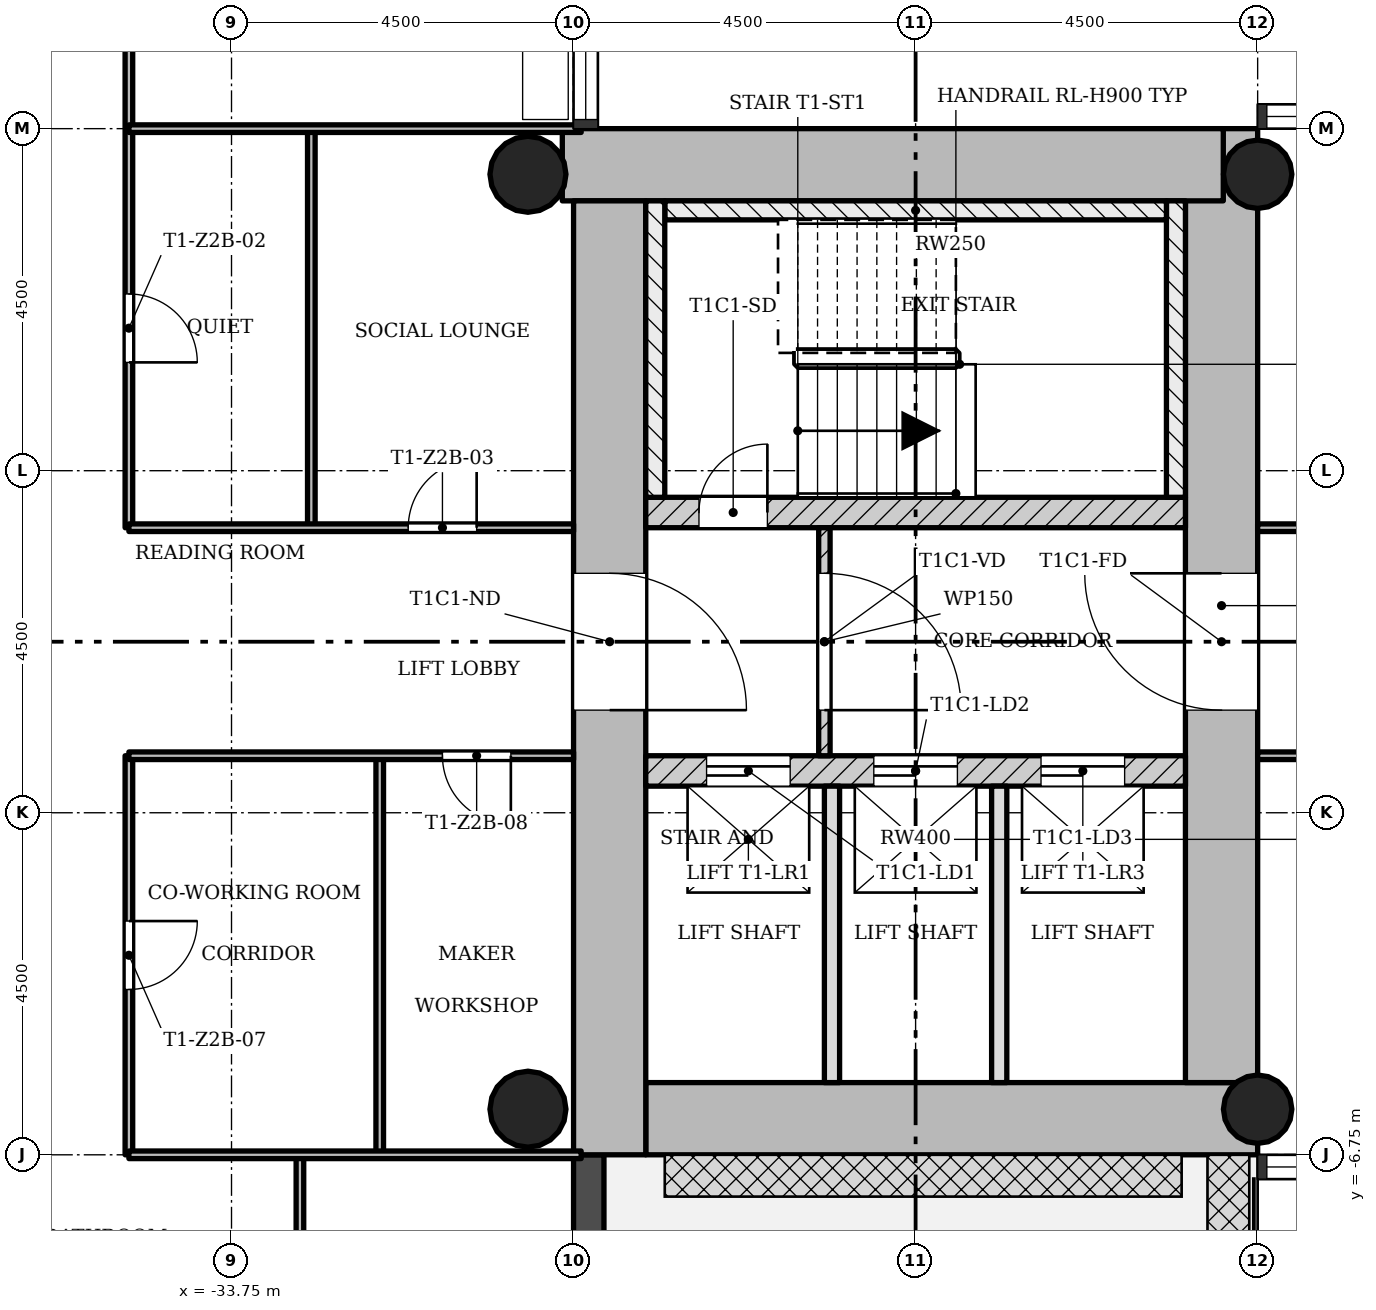
"""IFC4 building model, lengths in metres.
Left out: names, types, materials, properties, quantities, classifications, styles, units other than length and angle.
Written with IfcOpenShell. Run it as: python <this file> out.ifc"""

import sys

from ifc_helpers import new_model, si_unit, direction, frame, frame_2d, origin, origin_2d, place, context, subcontext, project, spatial, rectangle, hollow_circle, extrude, element, fill, save


model = new_model("IFC4")
c1 = context("Model", 3, precision=1e-05, world=origin(), true_north=direction((0.0, 1.0)))
c2 = subcontext(c1, "Body", "Model", "MODEL_VIEW")
j1 = project(units=[si_unit("LENGTHUNIT", "METRE"), si_unit("PLANEANGLEUNIT", "RADIAN")], contexts=[c1])
p1 = place(None, origin())
s1 = spatial("IfcSite", under=j1, at=p1, CompositionType="ELEMENT")
p2 = place(p1, origin())
s2 = spatial("IfcBuilding", under=s1, at=p2, CompositionType="ELEMENT")
p3 = place(p2, frame((0.0, 0.0, 76.6)))
s3 = spatial("IfcBuildingStorey", under=s2, at=p3, CompositionType="ELEMENT", Elevation=76.6)
p4 = place(p3, frame((-28.3, -6.275, 0.0), z_axis=(0.0, 0.0, 1.0), x_axis=(1.0, 0.0, 0.0)))
e1 = element("IfcWall", 1, at=p4, inside=s3, PredefinedType="SHEAR", context=c2, shape_type="SweptSolid", body=[
    extrude(rectangle(XDim=8.05, YDim=0.95, at=frame_2d((4.025, 0.0))), origin(), (0.0, 0.0, 1.0), 3.4),
])
p5 = place(p3, frame((-20.725, -5.8, 0.0), z_axis=(0.0, 0.0, 1.0), x_axis=(0.0, 1.0, 0.0)))
e2 = element("IfcWall", 2, at=p5, inside=s3, PredefinedType="SHEAR", context=c2, shape_type="SweptSolid", body=[
    extrude(rectangle(XDim=12.55, YDim=0.95, at=frame_2d((6.275, 0.0))), origin(), (0.0, 0.0, 1.0), 3.4),
])
p6 = place(p5, frame((4.9, 0.0, 0.0)))
e3 = element("IfcOpeningElement", 3, at=p6, cuts=e2, PredefinedType="OPENING", context=c2, shape_type="SweptSolid", body=[
    extrude(rectangle(XDim=1.8, YDim=2.1, at=frame_2d((0.9, 1.05))), frame((0.0, 0.485, 0.0), z_axis=(0.0, -1.0, 0.0), x_axis=(1.0, 0.0, 0.0)), (0.0, 0.0, 1.0), 0.97),
])
p7 = place(p3, frame((-20.702, 6.275, 0.0), z_axis=(0.0, 0.0, 1.0), x_axis=(-1.0, 0.0, 0.0)))
e4 = element("IfcWall", 4, at=p7, inside=s3, PredefinedType="SHEAR", context=c2, shape_type="SweptSolid", body=[
    extrude(rectangle(XDim=8.696, YDim=0.95, at=frame_2d((4.348, 0.0))), origin(), (0.0, 0.0, 1.0), 3.4),
])
p8 = place(p3, frame((-28.775, 5.8, 0.0), z_axis=(0.0, 0.0, 1.0), x_axis=(0.0, -1.0, 0.0)))
e5 = element("IfcWall", 5, at=p8, inside=s3, PredefinedType="SHEAR", context=c2, shape_type="SweptSolid", body=[
    extrude(rectangle(XDim=12.55, YDim=0.95, at=frame_2d((6.275, 0.0))), origin(), (0.0, 0.0, 1.0), 3.4),
])
p9 = place(p8, frame((4.9, 0.0, 0.0)))
e6 = element("IfcOpeningElement", 6, at=p9, cuts=e5, PredefinedType="OPENING", context=c2, shape_type="SweptSolid", body=[
    extrude(rectangle(XDim=1.8, YDim=2.1, at=frame_2d((0.9, 1.05))), frame((0.0, 0.485, 0.0), z_axis=(0.0, -1.0, 0.0), x_axis=(1.0, 0.0, 0.0)), (0.0, 0.0, 1.0), 0.97),
])
p10 = place(p3, frame((-28.3, -1.7, 0.0), z_axis=(0.0, 0.0, 1.0), x_axis=(1.0, 0.0, 0.0)))
e7 = element("IfcWall", 7, at=p10, inside=s3, PredefinedType="SHEAR", context=c2, shape_type="SweptSolid", body=[
    extrude(rectangle(XDim=7.1, YDim=0.4, at=frame_2d((3.55, 0.0))), origin(), (0.0, 0.0, 1.0), 3.4),
])
p11 = place(p10, frame((0.8, 0.0, 0.0)))
e8 = element("IfcOpeningElement", 8, at=p11, cuts=e7, PredefinedType="OPENING", context=c2, shape_type="SweptSolid", body=[
    extrude(rectangle(XDim=1.1, YDim=2.1, at=frame_2d((0.55, 1.05))), frame((0.0, 0.21, 0.0), z_axis=(0.0, -1.0, 0.0), x_axis=(1.0, 0.0, 0.0)), (0.0, 0.0, 1.0), 0.42),
])
p12 = place(p10, frame((3.0, 0.0, 0.0)))
e9 = element("IfcOpeningElement", 9, at=p12, cuts=e7, PredefinedType="OPENING", context=c2, shape_type="SweptSolid", body=[
    extrude(rectangle(XDim=1.1, YDim=2.1, at=frame_2d((0.55, 1.05))), frame((0.0, 0.21, 0.0), z_axis=(0.0, -1.0, 0.0), x_axis=(1.0, 0.0, 0.0)), (0.0, 0.0, 1.0), 0.42),
])
p13 = place(p10, frame((5.2, 0.0, 0.0)))
e10 = element("IfcOpeningElement", 10, at=p13, cuts=e7, PredefinedType="OPENING", context=c2, shape_type="SweptSolid", body=[
    extrude(rectangle(XDim=1.1, YDim=2.1, at=frame_2d((0.55, 1.05))), frame((0.0, 0.21, 0.0), z_axis=(0.0, -1.0, 0.0), x_axis=(1.0, 0.0, 0.0)), (0.0, 0.0, 1.0), 0.42),
])
p14 = place(p3, frame((-28.3, 1.7, 0.0), z_axis=(0.0, 0.0, 1.0), x_axis=(1.0, 0.0, 0.0)))
e11 = element("IfcWall", 11, at=p14, inside=s3, PredefinedType="SHEAR", context=c2, shape_type="SweptSolid", body=[
    extrude(rectangle(XDim=7.1, YDim=0.4, at=frame_2d((3.55, 0.0))), origin(), (0.0, 0.0, 1.0), 3.4),
])
p15 = place(p14, frame((0.7, 0.0, 0.0)))
e12 = element("IfcOpeningElement", 12, at=p15, cuts=e11, PredefinedType="OPENING", context=c2, shape_type="SweptSolid", body=[
    extrude(rectangle(XDim=0.9, YDim=2.1, at=frame_2d((0.45, 1.05))), frame((0.0, 0.21, 0.0), z_axis=(0.0, -1.0, 0.0), x_axis=(1.0, 0.0, 0.0)), (0.0, 0.0, 1.0), 0.42),
])
for number, where, z_axis, x_axis in (
    (13, (-20.25, -6.15, 0.0), (0.0, 0.0, 1.0), (1.0, 0.0, 0.0)),
    (14, (-20.25, 6.15, 0.0), (0.0, 0.0, 1.0), (1.0, 0.0, 0.0)),
):
    element("IfcColumn", number, at=place(p3, frame(where, z_axis=z_axis, x_axis=x_axis)), inside=s3, PredefinedType="COLUMN", context=c2, shape_type="SweptSolid", body=[
        extrude(hollow_circle(Radius=0.45, WallThickness=0.032, at=origin_2d()), origin(), (0.0, 0.0, 1.0), 3.4),
    ])
for number, where, z_axis, x_axis in (
    (15, (-29.85, -6.15, 0.0), (0.0, 0.0, 1.0), (1.0, 0.0, 0.0)),
    (16, (-29.85, 6.15, 0.0), (0.0, 0.0, 1.0), (1.0, 0.0, 0.0)),
):
    element("IfcColumn", number, at=place(p3, frame(where, z_axis=z_axis, x_axis=x_axis)), inside=s3, PredefinedType="COLUMN", context=c2, shape_type="SweptSolid", body=[
        extrude(hollow_circle(Radius=0.5, WallThickness=0.036, at=origin_2d()), origin(), (0.0, 0.0, 1.0), 3.4),
    ])
p16 = place(p3, frame((-29.05, -11.25, -0.02), z_axis=(0.0, 0.0, 1.0), x_axis=(0.0, 1.0, 0.0)))
e17 = element("IfcWall", 17, at=p16, inside=s3, PredefinedType="STANDARD", context=c2, shape_type="SweptSolid", body=[
    extrude(rectangle(XDim=4.5, YDim=0.4, at=frame_2d((2.25, 0.0))), origin(), (0.0, 0.0, 1.0), 3.12),
])
p17 = place(p16, frame((1.35, 0.0, 0.02)))
e18 = element("IfcOpeningElement", 18, at=p17, cuts=e17, PredefinedType="OPENING", context=c2, shape_type="SweptSolid", body=[
    extrude(rectangle(XDim=1.8, YDim=2.1, at=frame_2d((0.9, 1.05))), frame((0.0, 0.21, 0.0), z_axis=(0.0, -1.0, 0.0), x_axis=(1.0, 0.0, 0.0)), (0.0, 0.0, 1.0), 0.42),
])
p18 = place(p3, frame((-25.95, -1.5, 0.0), z_axis=(0.0, 0.0, 1.0), x_axis=(0.0, 1.0, 0.0)))
e19 = element("IfcWall", 19, at=p18, inside=s3, PredefinedType="PARTITIONING", context=c2, shape_type="SweptSolid", body=[
    extrude(rectangle(XDim=3.0, YDim=0.15, at=frame_2d((1.5, 0.0))), origin(), (0.0, 0.0, 1.0), 3.0),
])
p19 = place(p18, frame((0.6, 0.0, 0.0)))
e20 = element("IfcOpeningElement", 20, at=p19, cuts=e19, PredefinedType="OPENING", context=c2, shape_type="SweptSolid", body=[
    extrude(rectangle(XDim=1.8, YDim=2.1, at=frame_2d((0.9, 1.05))), frame((0.0, 0.085, 0.0), z_axis=(0.0, -1.0, 0.0), x_axis=(1.0, 0.0, 0.0)), (0.0, 0.0, 1.0), 0.17),
])
for number, where, z_axis, x_axis in (
    (21, (-25.85, -5.8, 0.0), (0.0, 0.0, 1.0), (0.0, 1.0, 0.0)),
    (22, (-23.65, -5.8, 0.0), (0.0, 0.0, 1.0), (0.0, 1.0, 0.0)),
):
    element("IfcWall", number, at=place(p3, frame(where, z_axis=z_axis, x_axis=x_axis)), inside=s3, PredefinedType="SOLIDWALL", context=c2, shape_type="SweptSolid", body=[
        extrude(rectangle(XDim=3.9, YDim=0.2, at=frame_2d((1.95, 0.0))), origin(), (0.0, 0.0, 1.0), 3.0),
    ])
p20 = place(p3, frame((-35.1, -6.75, 0.0), z_axis=(0.0, 0.0, 1.0), x_axis=(0.0, 1.0, 0.0)))
e23 = element("IfcWall", 23, at=p20, inside=s3, PredefinedType="PARTITIONING", context=c2, shape_type="SweptSolid", body=[
    extrude(rectangle(XDim=5.25, YDim=0.1, at=frame_2d((2.625, 0.0))), origin(), (0.0, 0.0, 1.0), 3.0),
])
p21 = place(p20, frame((2.175, 0.0, 0.0)))
e24 = element("IfcOpeningElement", 24, at=p21, cuts=e23, PredefinedType="OPENING", context=c2, shape_type="SweptSolid", body=[
    extrude(rectangle(XDim=0.9, YDim=2.1, at=frame_2d((0.45, 1.05))), frame((0.0, 0.06, 0.0), z_axis=(0.0, -1.0, 0.0), x_axis=(1.0, 0.0, 0.0)), (0.0, 0.0, 1.0), 0.12),
])
p22 = place(p3, frame((-35.1, 1.5, 0.0), z_axis=(0.0, 0.0, 1.0), x_axis=(0.0, 1.0, 0.0)))
e25 = element("IfcWall", 25, at=p22, inside=s3, PredefinedType="PARTITIONING", context=c2, shape_type="SweptSolid", body=[
    extrude(rectangle(XDim=9.75, YDim=0.1, at=frame_2d((4.875, 0.0))), origin(), (0.0, 0.0, 1.0), 3.0),
])
p23 = place(p22, frame((2.175, 0.0, 0.0)))
e26 = element("IfcOpeningElement", 26, at=p23, cuts=e25, PredefinedType="OPENING", context=c2, shape_type="SweptSolid", body=[
    extrude(rectangle(XDim=0.9, YDim=2.1, at=frame_2d((0.45, 1.05))), frame((0.0, 0.06, 0.0), z_axis=(0.0, -1.0, 0.0), x_axis=(1.0, 0.0, 0.0)), (0.0, 0.0, 1.0), 0.12),
])
p24 = place(p22, frame((7.05, 0.0, 0.0)))
e27 = element("IfcOpeningElement", 27, at=p24, cuts=e25, PredefinedType="OPENING", context=c2, shape_type="SweptSolid", body=[
    extrude(rectangle(XDim=0.9, YDim=2.1, at=frame_2d((0.45, 1.05))), frame((0.0, 0.06, 0.0), z_axis=(0.0, -1.0, 0.0), x_axis=(1.0, 0.0, 0.0)), (0.0, 0.0, 1.0), 0.12),
])
p25 = place(p3, frame((-32.85, -15.75, 0.0), z_axis=(0.0, 0.0, 1.0), x_axis=(0.0, 1.0, 0.0)))
e28 = element("IfcWall", 28, at=p25, inside=s3, PredefinedType="PARTITIONING", context=c2, shape_type="SweptSolid", body=[
    extrude(rectangle(XDim=9.0, YDim=0.1, at=frame_2d((4.5, 0.0))), origin(), (0.0, 0.0, 1.0), 3.0),
])
p26 = place(p25, frame((5.55, 0.0, 0.0)))
e29 = element("IfcOpeningElement", 29, at=p26, cuts=e28, PredefinedType="OPENING", context=c2, shape_type="SweptSolid", body=[
    extrude(rectangle(XDim=0.9, YDim=2.1, at=frame_2d((0.45, 1.05))), frame((0.0, 0.06, 0.0), z_axis=(0.0, -1.0, 0.0), x_axis=(1.0, 0.0, 0.0)), (0.0, 0.0, 1.0), 0.12),
])
for number, where, z_axis, x_axis in (
    (30, (-32.7, 1.5, 0.0), (0.0, 0.0, 1.0), (0.0, 1.0, 0.0)),
    (31, (-31.8, -6.75, 0.0), (0.0, 0.0, 1.0), (0.0, 1.0, 0.0)),
):
    element("IfcWall", number, at=place(p3, frame(where, z_axis=z_axis, x_axis=x_axis)), inside=s3, PredefinedType="PARTITIONING", context=c2, shape_type="SweptSolid", body=[
        extrude(rectangle(XDim=5.25, YDim=0.1, at=frame_2d((2.625, 0.0))), origin(), (0.0, 0.0, 1.0), 3.0),
    ])
p27 = place(p3, frame((-35.1, -6.75, 0.0), z_axis=(0.0, 0.0, 1.0), x_axis=(1.0, 0.0, 0.0)))
e32 = element("IfcWall", 32, at=p27, inside=s3, PredefinedType="PARTITIONING", context=c2, shape_type="SweptSolid", body=[
    extrude(rectangle(XDim=5.95, YDim=0.1, at=frame_2d((2.975, 0.0))), origin(), (0.0, 0.0, 1.0), 3.0),
])
p28 = place(p3, frame((-35.1, -1.5, 0.0), z_axis=(0.0, 0.0, 1.0), x_axis=(1.0, 0.0, 0.0)))
e33 = element("IfcWall", 33, at=p28, inside=s3, PredefinedType="PARTITIONING", context=c2, shape_type="SweptSolid", body=[
    extrude(rectangle(XDim=5.85, YDim=0.1, at=frame_2d((2.925, 0.0))), origin(), (0.0, 0.0, 1.0), 3.0),
])
p29 = place(p28, frame((4.125, 0.0, 0.0)))
e34 = element("IfcOpeningElement", 34, at=p29, cuts=e33, PredefinedType="OPENING", context=c2, shape_type="SweptSolid", body=[
    extrude(rectangle(XDim=0.9, YDim=2.1, at=frame_2d((0.45, 1.05))), frame((0.0, 0.06, 0.0), z_axis=(0.0, -1.0, 0.0), x_axis=(1.0, 0.0, 0.0)), (0.0, 0.0, 1.0), 0.12),
])
p30 = place(p3, frame((-20.25, -1.5, 0.0), z_axis=(0.0, 0.0, 1.0), x_axis=(1.0, 0.0, 0.0)))
e35 = element("IfcWall", 35, at=p30, inside=s3, PredefinedType="PARTITIONING", context=c2, shape_type="SweptSolid", body=[
    extrude(rectangle(XDim=4.5, YDim=0.1, at=frame_2d((2.25, 0.0))), origin(), (0.0, 0.0, 1.0), 3.0),
])
p31 = place(p30, frame((1.8, 0.0, 0.0)))
e36 = element("IfcOpeningElement", 36, at=p31, cuts=e35, PredefinedType="OPENING", context=c2, shape_type="SweptSolid", body=[
    extrude(rectangle(XDim=0.9, YDim=2.1, at=frame_2d((0.45, 1.05))), frame((0.0, 0.06, 0.0), z_axis=(0.0, -1.0, 0.0), x_axis=(1.0, 0.0, 0.0)), (0.0, 0.0, 1.0), 0.12),
])
p32 = place(p3, frame((-35.1, 1.5, 0.0), z_axis=(0.0, 0.0, 1.0), x_axis=(1.0, 0.0, 0.0)))
e37 = element("IfcWall", 37, at=p32, inside=s3, PredefinedType="PARTITIONING", context=c2, shape_type="SweptSolid", body=[
    extrude(rectangle(XDim=5.85, YDim=0.1, at=frame_2d((2.925, 0.0))), origin(), (0.0, 0.0, 1.0), 3.0),
])
p33 = place(p32, frame((3.675, 0.0, 0.0)))
e38 = element("IfcOpeningElement", 38, at=p33, cuts=e37, PredefinedType="OPENING", context=c2, shape_type="SweptSolid", body=[
    extrude(rectangle(XDim=0.9, YDim=2.1, at=frame_2d((0.45, 1.05))), frame((0.0, 0.06, 0.0), z_axis=(0.0, -1.0, 0.0), x_axis=(1.0, 0.0, 0.0)), (0.0, 0.0, 1.0), 0.12),
])
p34 = place(p3, frame((-20.25, 1.5, 0.0), z_axis=(0.0, 0.0, 1.0), x_axis=(1.0, 0.0, 0.0)))
e39 = element("IfcWall", 39, at=p34, inside=s3, PredefinedType="PARTITIONING", context=c2, shape_type="SweptSolid", body=[
    extrude(rectangle(XDim=4.5, YDim=0.1, at=frame_2d((2.25, 0.0))), origin(), (0.0, 0.0, 1.0), 3.0),
])
p35 = place(p34, frame((1.8, 0.0, 0.0)))
e40 = element("IfcOpeningElement", 40, at=p35, cuts=e39, PredefinedType="OPENING", context=c2, shape_type="SweptSolid", body=[
    extrude(rectangle(XDim=0.9, YDim=2.1, at=frame_2d((0.45, 1.05))), frame((0.0, 0.06, 0.0), z_axis=(0.0, -1.0, 0.0), x_axis=(1.0, 0.0, 0.0)), (0.0, 0.0, 1.0), 0.12),
])
p36 = place(p3, frame((-35.1, 6.75, 0.0), z_axis=(0.0, 0.0, 1.0), x_axis=(1.0, 0.0, 0.0)))
e41 = element("IfcWall", 41, at=p36, inside=s3, PredefinedType="PARTITIONING", context=c2, shape_type="SweptSolid", body=[
    extrude(rectangle(XDim=5.95, YDim=0.1, at=frame_2d((2.975, 0.0))), origin(), (0.0, 0.0, 1.0), 3.0),
])
p37 = place(p3, frame((-21.325, 1.9, 0.0), z_axis=(0.0, 0.0, 1.0), x_axis=(0.0, 1.0, 0.0)))
e42 = element("IfcWall", 42, at=p37, inside=s3, PredefinedType="SHEAR", context=c2, shape_type="SweptSolid", body=[
    extrude(rectangle(XDim=3.9, YDim=0.25, at=frame_2d((1.95, 0.0))), origin(), (0.0, 0.0, 1.0), 3.4),
])
p38 = place(p3, frame((-28.05, 5.675, 0.0), z_axis=(0.0, 0.0, 1.0), x_axis=(1.0, 0.0, 0.0)))
e43 = element("IfcWall", 43, at=p38, inside=s3, PredefinedType="SHEAR", context=c2, shape_type="SweptSolid", body=[
    extrude(rectangle(XDim=6.6, YDim=0.25, at=frame_2d((3.3, 0.0))), origin(), (0.0, 0.0, 1.0), 3.4),
])
p39 = place(p3, frame((-28.175, 1.9, 0.0), z_axis=(0.0, 0.0, 1.0), x_axis=(0.0, 1.0, 0.0)))
e44 = element("IfcWall", 44, at=p39, inside=s3, PredefinedType="SHEAR", context=c2, shape_type="SweptSolid", body=[
    extrude(rectangle(XDim=3.9, YDim=0.25, at=frame_2d((1.95, 0.0))), origin(), (0.0, 0.0, 1.0), 3.4),
])
p40 = place(p19, origin())
e45 = element("IfcDoor", 45, at=p40, inside=s3, OperationType="SINGLE_SWING_LEFT", PredefinedType="DOOR", context=c2, shape_type="SweptSolid", body=[
    extrude(rectangle(XDim=1.8, YDim=2.1, at=frame_2d((0.9, 1.05))), frame((0.0, 0.025, 0.0), z_axis=(0.0, -1.0, 0.0), x_axis=(1.0, 0.0, 0.0)), (0.0, 0.0, 1.0), 0.05),
])
fill(e20, e45)
p41 = place(p23, origin())
e46 = element("IfcDoor", 46, at=p41, inside=s3, OperationType="SINGLE_SWING_LEFT", PredefinedType="DOOR", context=c2, shape_type="SweptSolid", body=[
    extrude(rectangle(XDim=0.9, YDim=2.1, at=frame_2d((0.45, 1.05))), frame((0.0, 0.025, 0.0), z_axis=(0.0, -1.0, 0.0), x_axis=(1.0, 0.0, 0.0)), (0.0, 0.0, 1.0), 0.05),
])
fill(e26, e46)
p42 = place(p33, origin())
e47 = element("IfcDoor", 47, at=p42, inside=s3, OperationType="SINGLE_SWING_LEFT", PredefinedType="DOOR", context=c2, shape_type="SweptSolid", body=[
    extrude(rectangle(XDim=0.9, YDim=2.1, at=frame_2d((0.45, 1.05))), frame((0.0, 0.025, 0.0), z_axis=(0.0, -1.0, 0.0), x_axis=(1.0, 0.0, 0.0)), (0.0, 0.0, 1.0), 0.05),
])
fill(e38, e47)
p43 = place(p21, origin())
e48 = element("IfcDoor", 48, at=p43, inside=s3, OperationType="SINGLE_SWING_RIGHT", PredefinedType="DOOR", context=c2, shape_type="SweptSolid", body=[
    extrude(rectangle(XDim=0.9, YDim=2.1, at=frame_2d((0.45, 1.05))), frame((0.0, 0.025, 0.0), z_axis=(0.0, -1.0, 0.0), x_axis=(1.0, 0.0, 0.0)), (0.0, 0.0, 1.0), 0.05),
])
fill(e24, e48)
p44 = place(p29, origin())
e49 = element("IfcDoor", 49, at=p44, inside=s3, OperationType="SINGLE_SWING_RIGHT", PredefinedType="DOOR", context=c2, shape_type="SweptSolid", body=[
    extrude(rectangle(XDim=0.9, YDim=2.1, at=frame_2d((0.45, 1.05))), frame((0.0, 0.025, 0.0), z_axis=(0.0, -1.0, 0.0), x_axis=(1.0, 0.0, 0.0)), (0.0, 0.0, 1.0), 0.05),
])
fill(e34, e49)
p45 = place(p15, origin())
e50 = element("IfcDoor", 50, at=p45, inside=s3, OperationType="SINGLE_SWING_LEFT", PredefinedType="DOOR", context=c2, shape_type="SweptSolid", body=[
    extrude(rectangle(XDim=0.9, YDim=2.1, at=frame_2d((0.45, 1.05))), frame((0.0, 0.025, 0.0), z_axis=(0.0, -1.0, 0.0), x_axis=(1.0, 0.0, 0.0)), (0.0, 0.0, 1.0), 0.05),
])
fill(e12, e50)
p46 = place(p11, origin())
e51 = element("IfcDoor", 51, at=p46, inside=s3, OperationType="SLIDING_TO_LEFT", PredefinedType="DOOR", context=c2, shape_type="SweptSolid", body=[
    extrude(rectangle(XDim=1.1, YDim=2.1, at=frame_2d((0.55, 1.05))), frame((0.0, 0.025, 0.0), z_axis=(0.0, -1.0, 0.0), x_axis=(1.0, 0.0, 0.0)), (0.0, 0.0, 1.0), 0.05),
])
fill(e8, e51)
p47 = place(p12, origin())
e52 = element("IfcDoor", 52, at=p47, inside=s3, OperationType="SLIDING_TO_LEFT", PredefinedType="DOOR", context=c2, shape_type="SweptSolid", body=[
    extrude(rectangle(XDim=1.1, YDim=2.1, at=frame_2d((0.55, 1.05))), frame((0.0, 0.025, 0.0), z_axis=(0.0, -1.0, 0.0), x_axis=(1.0, 0.0, 0.0)), (0.0, 0.0, 1.0), 0.05),
])
fill(e9, e52)
p48 = place(p13, origin())
e53 = element("IfcDoor", 53, at=p48, inside=s3, OperationType="SLIDING_TO_LEFT", PredefinedType="DOOR", context=c2, shape_type="SweptSolid", body=[
    extrude(rectangle(XDim=1.1, YDim=2.1, at=frame_2d((0.55, 1.05))), frame((0.0, 0.025, 0.0), z_axis=(0.0, -1.0, 0.0), x_axis=(1.0, 0.0, 0.0)), (0.0, 0.0, 1.0), 0.05),
])
fill(e10, e53)
p49 = place(p9, origin())
e54 = element("IfcDoor", 54, at=p49, inside=s3, OperationType="SINGLE_SWING_LEFT", PredefinedType="DOOR", context=c2, shape_type="SweptSolid", body=[
    extrude(rectangle(XDim=1.8, YDim=2.1, at=frame_2d((0.9, 1.05))), frame((0.0, 0.025, 0.0), z_axis=(0.0, -1.0, 0.0), x_axis=(1.0, 0.0, 0.0)), (0.0, 0.0, 1.0), 0.05),
])
fill(e6, e54)
p50 = place(p6, origin())
e55 = element("IfcDoor", 55, at=p50, inside=s3, OperationType="SINGLE_SWING_LEFT", PredefinedType="DOOR", context=c2, shape_type="SweptSolid", body=[
    extrude(rectangle(XDim=1.8, YDim=2.1, at=frame_2d((0.9, 1.05))), frame((0.0, 0.025, 0.0), z_axis=(0.0, -1.0, 0.0), x_axis=(1.0, 0.0, 0.0)), (0.0, 0.0, 1.0), 0.05),
])
fill(e3, e55)
save(model, sys.argv[1])
